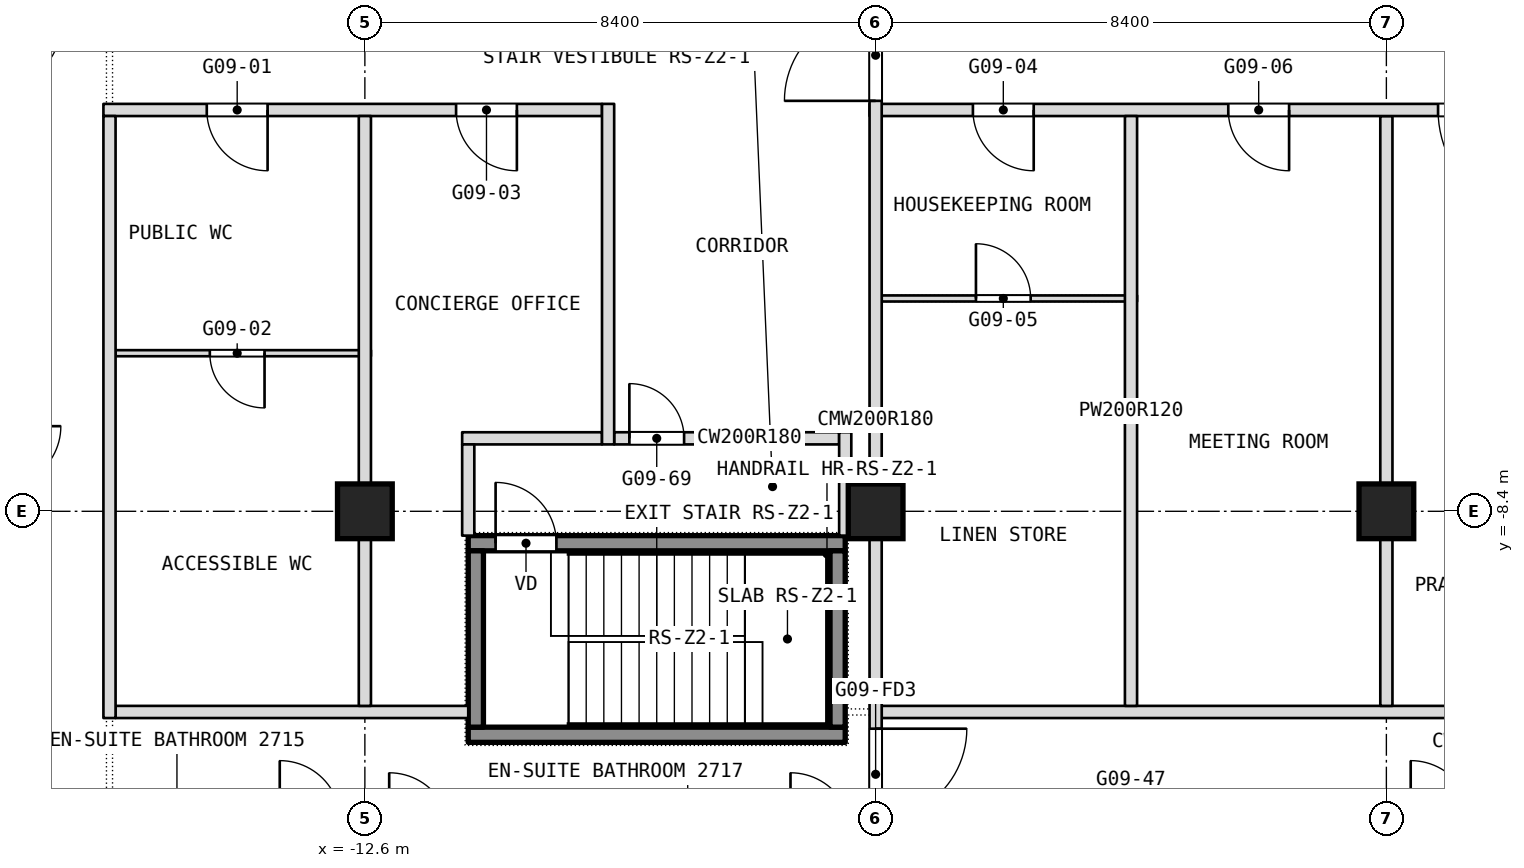
"""IFC4 building model, lengths in metres.
Left out: names, types, materials, properties, quantities, classifications, styles, units other than length and angle.
Written with IfcOpenShell. Run it as: python <this file> out.ifc"""

import sys

from ifc_helpers import new_model, si_unit, direction, frame, frame_2d, origin, origin_2d, place, context, subcontext, project, spatial, rectangle, extrude, element, fill, save


model = new_model("IFC4")
c1 = context("Model", 3, precision=1e-05, world=origin(), true_north=direction((0.0, 1.0)))
c2 = subcontext(c1, "Body", "Model", "MODEL_VIEW")
j1 = project(units=[si_unit("LENGTHUNIT", "METRE"), si_unit("PLANEANGLEUNIT", "RADIAN")], contexts=[c1])
p1 = place(None, origin())
s1 = spatial("IfcSite", under=j1, at=p1, CompositionType="ELEMENT")
p2 = place(p1, origin())
s2 = spatial("IfcBuilding", under=s1, at=p2, CompositionType="ELEMENT")
p3 = place(p2, frame((0.0, 0.0, 122.9)))
s3 = spatial("IfcBuildingStorey", under=s2, at=p3, CompositionType="ELEMENT", Elevation=122.9)
for number, where, z_axis, x_axis in (
    (1, (-12.6, -8.4, 0.0), (0.0, 0.0, 1.0), (1.0, 0.0, 0.0)),
    (2, (-4.2, -8.4, 0.0), (0.0, 0.0, 1.0), (1.0, 0.0, 0.0)),
    (3, (4.2, -8.4, 0.0), (0.0, 0.0, 1.0), (1.0, 0.0, 0.0)),
):
    element("IfcColumn", number, at=place(p3, frame(where, z_axis=z_axis, x_axis=x_axis)), inside=s3, PredefinedType="COLUMN", context=c2, shape_type="SweptSolid", body=[
        extrude(rectangle(XDim=0.9, YDim=0.9, at=origin_2d()), origin(), (0.0, 0.0, 1.0), 3.6),
    ])
p4 = place(p3, frame((-16.7, -11.7, 0.0), z_axis=(0.0, 0.0, 1.0), x_axis=(1.0, 0.0, 0.0)))
e4 = element("IfcWall", 4, at=p4, inside=s3, PredefinedType="PARTITIONING", context=c2, shape_type="SweptSolid", body=[
    extrude(rectangle(XDim=5.8, YDim=0.2, at=frame_2d((2.9, 0.0))), origin(), (0.0, 0.0, 1.0), 3.34),
])
p5 = place(p3, frame((-4.1, -11.7, 0.0), z_axis=(0.0, 0.0, 1.0), x_axis=(1.0, 0.0, 0.0)))
e5 = element("IfcWall", 5, at=p5, inside=s3, PredefinedType="PARTITIONING", context=c2, shape_type="SweptSolid", body=[
    extrude(rectangle(XDim=20.8, YDim=0.2, at=frame_2d((10.4, 0.0))), origin(), (0.0, 0.0, 1.0), 3.34),
])
p6 = place(p3, frame((-11.0, -7.2, 0.0), z_axis=(0.0, 0.0, 1.0), x_axis=(1.0, 0.0, 0.0)))
e6 = element("IfcWall", 6, at=p6, inside=s3, PredefinedType="PARTITIONING", context=c2, shape_type="SweptSolid", body=[
    extrude(rectangle(XDim=2.3, YDim=0.2, at=frame_2d((1.15, 0.0))), origin(), (0.0, 0.0, 1.0), 3.34),
])
p7 = place(p3, frame((-8.5, -7.2, 0.0), z_axis=(0.0, 0.0, 1.0), x_axis=(1.0, 0.0, 0.0)))
e7 = element("IfcWall", 7, at=p7, inside=s3, PredefinedType="PARTITIONING", context=c2, shape_type="SweptSolid", body=[
    extrude(rectangle(XDim=3.7, YDim=0.2, at=frame_2d((1.85, 0.0))), origin(), (0.0, 0.0, 1.0), 3.34),
])
p8 = place(p7, frame((0.25, 0.0, 0.0)))
e8 = element("IfcOpeningElement", 8, at=p8, cuts=e7, PredefinedType="OPENING", context=c2, shape_type="SweptSolid", body=[
    extrude(rectangle(XDim=0.9, YDim=2.1, at=frame_2d((0.45, 1.05))), frame((0.0, 0.1, 0.0), z_axis=(0.0, -1.0, 0.0), x_axis=(1.0, 0.0, 0.0)), (0.0, 0.0, 1.0), 0.2),
])
p9 = place(p3, frame((-16.7, -5.8, 0.0), z_axis=(0.0, 0.0, 1.0), x_axis=(1.0, 0.0, 0.0)))
e9 = element("IfcWall", 9, at=p9, inside=s3, PredefinedType="PARTITIONING", context=c2, shape_type="SweptSolid", body=[
    extrude(rectangle(XDim=4.2, YDim=0.1, at=frame_2d((2.1, 0.0))), origin(), (0.0, 0.0, 1.0), 3.34),
])
p10 = place(p9, frame((1.55, 0.0, 0.0)))
e10 = element("IfcOpeningElement", 10, at=p10, cuts=e9, PredefinedType="OPENING", context=c2, shape_type="SweptSolid", body=[
    extrude(rectangle(XDim=0.9, YDim=2.1, at=frame_2d((0.45, 1.05))), frame((0.0, 0.05, 0.0), z_axis=(0.0, -1.0, 0.0), x_axis=(1.0, 0.0, 0.0)), (0.0, 0.0, 1.0), 0.1),
])
p11 = place(p3, frame((-4.1, -4.9, 0.0), z_axis=(0.0, 0.0, 1.0), x_axis=(1.0, 0.0, 0.0)))
e11 = element("IfcWall", 11, at=p11, inside=s3, PredefinedType="PARTITIONING", context=c2, shape_type="SweptSolid", body=[
    extrude(rectangle(XDim=4.2, YDim=0.1, at=frame_2d((2.1, 0.0))), origin(), (0.0, 0.0, 1.0), 3.34),
])
p12 = place(p11, frame((1.55, 0.0, 0.0)))
e12 = element("IfcOpeningElement", 12, at=p12, cuts=e11, PredefinedType="OPENING", context=c2, shape_type="SweptSolid", body=[
    extrude(rectangle(XDim=0.9, YDim=2.1, at=frame_2d((0.45, 1.05))), frame((0.0, 0.05, 0.0), z_axis=(0.0, -1.0, 0.0), x_axis=(1.0, 0.0, 0.0)), (0.0, 0.0, 1.0), 0.1),
])
p13 = place(p3, frame((4.2, -11.6, 0.0), z_axis=(0.0, 0.0, 1.0), x_axis=(0.0, 1.0, 0.0)))
e13 = element("IfcWall", 13, at=p13, inside=s3, PredefinedType="PARTITIONING", context=c2, shape_type="SweptSolid", body=[
    extrude(rectangle(XDim=9.7, YDim=0.2, at=frame_2d((4.85, 0.0))), origin(), (0.0, 0.0, 1.0), 3.34),
])
p14 = place(p3, frame((-16.9, -1.8, 0.0), z_axis=(0.0, 0.0, 1.0), x_axis=(1.0, 0.0, 0.0)))
e14 = element("IfcWall", 14, at=p14, inside=s3, PredefinedType="PARTITIONING", context=c2, shape_type="SweptSolid", body=[
    extrude(rectangle(XDim=8.2, YDim=0.2, at=frame_2d((4.1, 0.0))), origin(), (0.0, 0.0, 1.0), 3.34),
])
p15 = place(p14, frame((1.7, 0.0, 0.0)))
e15 = element("IfcOpeningElement", 15, at=p15, cuts=e14, PredefinedType="OPENING", context=c2, shape_type="SweptSolid", body=[
    extrude(rectangle(XDim=1.0, YDim=2.1, at=frame_2d((0.5, 1.05))), frame((0.0, 0.1, 0.0), z_axis=(0.0, -1.0, 0.0), x_axis=(1.0, 0.0, 0.0)), (0.0, 0.0, 1.0), 0.2),
])
p16 = place(p14, frame((5.8, 0.0, 0.0)))
e16 = element("IfcOpeningElement", 16, at=p16, cuts=e14, PredefinedType="OPENING", context=c2, shape_type="SweptSolid", body=[
    extrude(rectangle(XDim=1.0, YDim=2.1, at=frame_2d((0.5, 1.05))), frame((0.0, 0.1, 0.0), z_axis=(0.0, -1.0, 0.0), x_axis=(1.0, 0.0, 0.0)), (0.0, 0.0, 1.0), 0.2),
])
p17 = place(p3, frame((-4.3, -1.8, 0.0), z_axis=(0.0, 0.0, 1.0), x_axis=(1.0, 0.0, 0.0)))
e17 = element("IfcWall", 17, at=p17, inside=s3, PredefinedType="PARTITIONING", context=c2, shape_type="SweptSolid", body=[
    extrude(rectangle(XDim=11.3, YDim=0.2, at=frame_2d((5.65, 0.0))), origin(), (0.0, 0.0, 1.0), 3.34),
])
p18 = place(p17, frame((1.7, 0.0, 0.0)))
e18 = element("IfcOpeningElement", 18, at=p18, cuts=e17, PredefinedType="OPENING", context=c2, shape_type="SweptSolid", body=[
    extrude(rectangle(XDim=1.0, YDim=2.1, at=frame_2d((0.5, 1.05))), frame((0.0, 0.1, 0.0), z_axis=(0.0, -1.0, 0.0), x_axis=(1.0, 0.0, 0.0)), (0.0, 0.0, 1.0), 0.2),
])
p19 = place(p17, frame((5.9, 0.0, 0.0)))
e19 = element("IfcOpeningElement", 19, at=p19, cuts=e17, PredefinedType="OPENING", context=c2, shape_type="SweptSolid", body=[
    extrude(rectangle(XDim=1.0, YDim=2.1, at=frame_2d((0.5, 1.05))), frame((0.0, 0.1, 0.0), z_axis=(0.0, -1.0, 0.0), x_axis=(1.0, 0.0, 0.0)), (0.0, 0.0, 1.0), 0.2),
])
p20 = place(p17, frame((9.35, 0.0, 0.0)))
e20 = element("IfcOpeningElement", 20, at=p20, cuts=e17, PredefinedType="OPENING", context=c2, shape_type="SweptSolid", body=[
    extrude(rectangle(XDim=1.8, YDim=2.1, at=frame_2d((0.9, 1.05))), frame((0.0, 0.1, 0.0), z_axis=(0.0, -1.0, 0.0), x_axis=(1.0, 0.0, 0.0)), (0.0, 0.0, 1.0), 0.2),
])
p21 = place(p3, frame((0.0, -11.6, 0.0), z_axis=(0.0, 0.0, 1.0), x_axis=(0.0, 1.0, 0.0)))
e21 = element("IfcWall", 21, at=p21, inside=s3, PredefinedType="PARTITIONING", context=c2, shape_type="SweptSolid", body=[
    extrude(rectangle(XDim=9.7, YDim=0.2, at=frame_2d((4.85, 0.0))), origin(), (0.0, 0.0, 1.0), 3.34),
])
p22 = place(p3, frame((-4.2, -13.8, 0.0), z_axis=(0.0, 0.0, 1.0), x_axis=(0.0, 1.0, 0.0)))
e22 = element("IfcWall", 22, at=p22, inside=s3, PredefinedType="PARTITIONING", context=c2, shape_type="SweptSolid", body=[
    extrude(rectangle(XDim=13.8, YDim=0.2, at=frame_2d((6.9, 0.0))), origin(), (0.0, 0.0, 1.0), 3.34),
])
p23 = place(p22, frame((12.15, 0.0, 0.0)))
e23 = element("IfcOpeningElement", 23, at=p23, cuts=e22, PredefinedType="OPENING", context=c2, shape_type="SweptSolid", body=[
    extrude(rectangle(XDim=1.5, YDim=2.1, at=frame_2d((0.75, 1.05))), frame((0.0, 0.1, 0.0), z_axis=(0.0, -1.0, 0.0), x_axis=(1.0, 0.0, 0.0)), (0.0, 0.0, 1.0), 0.2),
])
p24 = place(p22, frame((0.325, 0.0, 0.0)))
e24 = element("IfcOpeningElement", 24, at=p24, cuts=e22, PredefinedType="OPENING", context=c2, shape_type="SweptSolid", body=[
    extrude(rectangle(XDim=1.5, YDim=2.1, at=frame_2d((0.75, 1.05))), frame((0.0, 0.1, 0.0), z_axis=(0.0, -1.0, 0.0), x_axis=(1.0, 0.0, 0.0)), (0.0, 0.0, 1.0), 0.2),
])
p25 = place(p3, frame((-4.7, -8.8, 0.0), z_axis=(0.0, 0.0, 1.0), x_axis=(0.0, 1.0, 0.0)))
e25 = element("IfcWall", 25, at=p25, inside=s3, PredefinedType="PARTITIONING", context=c2, shape_type="SweptSolid", body=[
    extrude(rectangle(XDim=1.7, YDim=0.2, at=frame_2d((0.85, 0.0))), origin(), (0.0, 0.0, 1.0), 3.34),
])
p26 = place(p3, frame((-8.6, -7.3, 0.0), z_axis=(0.0, 0.0, 1.0), x_axis=(0.0, 1.0, 0.0)))
e26 = element("IfcWall", 26, at=p26, inside=s3, PredefinedType="PARTITIONING", context=c2, shape_type="SweptSolid", body=[
    extrude(rectangle(XDim=5.6, YDim=0.2, at=frame_2d((2.8, 0.0))), origin(), (0.0, 0.0, 1.0), 3.34),
])
p27 = place(p3, frame((-10.9, -8.8, 0.0), z_axis=(0.0, 0.0, 1.0), x_axis=(0.0, 1.0, 0.0)))
e27 = element("IfcWall", 27, at=p27, inside=s3, PredefinedType="PARTITIONING", context=c2, shape_type="SweptSolid", body=[
    extrude(rectangle(XDim=1.5, YDim=0.2, at=frame_2d((0.75, 0.0))), origin(), (0.0, 0.0, 1.0), 3.34),
])
p28 = place(p3, frame((-12.6, -11.6, 0.0), z_axis=(0.0, 0.0, 1.0), x_axis=(0.0, 1.0, 0.0)))
e28 = element("IfcWall", 28, at=p28, inside=s3, PredefinedType="PARTITIONING", context=c2, shape_type="SweptSolid", body=[
    extrude(rectangle(XDim=9.7, YDim=0.2, at=frame_2d((4.85, 0.0))), origin(), (0.0, 0.0, 1.0), 3.34),
])
p29 = place(p3, frame((-16.8, -11.8, 0.0), z_axis=(0.0, 0.0, 1.0), x_axis=(0.0, 1.0, 0.0)))
e29 = element("IfcWall", 29, at=p29, inside=s3, PredefinedType="PARTITIONING", context=c2, shape_type="SweptSolid", body=[
    extrude(rectangle(XDim=9.9, YDim=0.2, at=frame_2d((4.95, 0.0))), origin(), (0.0, 0.0, 1.0), 3.34),
])
p30 = place(p3, frame((-10.9, -12.075, 0.1), z_axis=(0.0, 0.0, 1.0), x_axis=(1.0, 0.0, 0.0)))
e30 = element("IfcWall", 30, at=p30, inside=s3, PredefinedType="SHEAR", context=c2, shape_type="SweptSolid", body=[
    extrude(rectangle(XDim=6.2, YDim=0.25, at=frame_2d((3.1, 0.0))), origin(), (0.0, 0.0, 1.0), 3.6),
])
p31 = place(p3, frame((-10.9, -8.925, 0.1), z_axis=(0.0, 0.0, 1.0), x_axis=(1.0, 0.0, 0.0)))
e31 = element("IfcWall", 31, at=p31, inside=s3, PredefinedType="SHEAR", context=c2, shape_type="SweptSolid", body=[
    extrude(rectangle(XDim=6.2, YDim=0.25, at=frame_2d((3.1, 0.0))), origin(), (0.0, 0.0, 1.0), 3.6),
])
p32 = place(p31, frame((0.45, 0.0, 0.0)))
e32 = element("IfcOpeningElement", 32, at=p32, cuts=e31, PredefinedType="OPENING", context=c2, shape_type="SweptSolid", body=[
    extrude(rectangle(XDim=1.0, YDim=2.1, at=frame_2d((0.5, 1.05))), frame((0.0, 0.125, 0.0), z_axis=(0.0, -1.0, 0.0), x_axis=(1.0, 0.0, 0.0)), (0.0, 0.0, 1.0), 0.25),
])
for number, where, z_axis, x_axis in (
    (33, (-10.775, -11.95, 0.1), (0.0, 0.0, 1.0), (0.0, 1.0, 0.0)),
    (34, (-4.825, -11.95, 0.1), (0.0, 0.0, 1.0), (0.0, 1.0, 0.0)),
):
    element("IfcWall", number, at=place(p3, frame(where, z_axis=z_axis, x_axis=x_axis)), inside=s3, PredefinedType="SHEAR", context=c2, shape_type="SweptSolid", body=[
        extrude(rectangle(XDim=2.9, YDim=0.25, at=frame_2d((1.45, 0.0))), origin(), (0.0, 0.0, 1.0), 3.6),
    ])
p33 = place(p8, origin())
e35 = element("IfcDoor", 35, at=p33, inside=s3, OperationType="SINGLE_SWING_RIGHT", PredefinedType="DOOR", context=c2, shape_type="SweptSolid", body=[
    extrude(rectangle(XDim=0.9, YDim=2.1, at=frame_2d((0.45, 1.05))), frame((0.0, 0.025, 0.0), z_axis=(0.0, -1.0, 0.0), x_axis=(1.0, 0.0, 0.0)), (0.0, 0.0, 1.0), 0.05),
])
fill(e8, e35)
p34 = place(p10, origin())
e36 = element("IfcDoor", 36, at=p34, inside=s3, OperationType="SINGLE_SWING_RIGHT", PredefinedType="DOOR", context=c2, shape_type="SweptSolid", body=[
    extrude(rectangle(XDim=0.9, YDim=2.1, at=frame_2d((0.45, 1.05))), frame((0.0, 0.025, 0.0), z_axis=(0.0, -1.0, 0.0), x_axis=(1.0, 0.0, 0.0)), (0.0, 0.0, 1.0), 0.05),
])
fill(e10, e36)
p35 = place(p12, origin())
e37 = element("IfcDoor", 37, at=p35, inside=s3, OperationType="SINGLE_SWING_LEFT", PredefinedType="DOOR", context=c2, shape_type="SweptSolid", body=[
    extrude(rectangle(XDim=0.9, YDim=2.1, at=frame_2d((0.45, 1.05))), frame((0.0, 0.025, 0.0), z_axis=(0.0, -1.0, 0.0), x_axis=(1.0, 0.0, 0.0)), (0.0, 0.0, 1.0), 0.05),
])
fill(e12, e37)
p36 = place(p15, origin())
e38 = element("IfcDoor", 38, at=p36, inside=s3, OperationType="SINGLE_SWING_LEFT", PredefinedType="DOOR", context=c2, shape_type="SweptSolid", body=[
    extrude(rectangle(XDim=1.0, YDim=2.1, at=frame_2d((0.5, 1.05))), frame((0.0, 0.025, 0.0), z_axis=(0.0, -1.0, 0.0), x_axis=(1.0, 0.0, 0.0)), (0.0, 0.0, 1.0), 0.05),
])
fill(e15, e38)
p37 = place(p16, origin())
e39 = element("IfcDoor", 39, at=p37, inside=s3, OperationType="SINGLE_SWING_LEFT", PredefinedType="DOOR", context=c2, shape_type="SweptSolid", body=[
    extrude(rectangle(XDim=1.0, YDim=2.1, at=frame_2d((0.5, 1.05))), frame((0.0, 0.025, 0.0), z_axis=(0.0, -1.0, 0.0), x_axis=(1.0, 0.0, 0.0)), (0.0, 0.0, 1.0), 0.05),
])
fill(e16, e39)
p38 = place(p18, origin())
e40 = element("IfcDoor", 40, at=p38, inside=s3, OperationType="SINGLE_SWING_RIGHT", PredefinedType="DOOR", context=c2, shape_type="SweptSolid", body=[
    extrude(rectangle(XDim=1.0, YDim=2.1, at=frame_2d((0.5, 1.05))), frame((0.0, 0.025, 0.0), z_axis=(0.0, -1.0, 0.0), x_axis=(1.0, 0.0, 0.0)), (0.0, 0.0, 1.0), 0.05),
])
fill(e18, e40)
p39 = place(p19, origin())
e41 = element("IfcDoor", 41, at=p39, inside=s3, OperationType="SINGLE_SWING_RIGHT", PredefinedType="DOOR", context=c2, shape_type="SweptSolid", body=[
    extrude(rectangle(XDim=1.0, YDim=2.1, at=frame_2d((0.5, 1.05))), frame((0.0, 0.025, 0.0), z_axis=(0.0, -1.0, 0.0), x_axis=(1.0, 0.0, 0.0)), (0.0, 0.0, 1.0), 0.05),
])
fill(e19, e41)
p40 = place(p20, origin())
e42 = element("IfcDoor", 42, at=p40, inside=s3, OperationType="DOUBLE_DOOR_SINGLE_SWING", PredefinedType="DOOR", context=c2, shape_type="SweptSolid", body=[
    extrude(rectangle(XDim=1.8, YDim=2.1, at=frame_2d((0.9, 1.05))), frame((0.0, 0.025, 0.0), z_axis=(0.0, -1.0, 0.0), x_axis=(1.0, 0.0, 0.0)), (0.0, 0.0, 1.0), 0.05),
])
fill(e20, e42)
p41 = place(p32, origin())
e43 = element("IfcDoor", 43, at=p41, inside=s3, OperationType="SINGLE_SWING_LEFT", PredefinedType="DOOR", context=c2, shape_type="SweptSolid", body=[
    extrude(rectangle(XDim=1.0, YDim=2.1, at=frame_2d((0.5, 1.05))), frame((0.0, 0.025, 0.0), z_axis=(0.0, -1.0, 0.0), x_axis=(1.0, 0.0, 0.0)), (0.0, 0.0, 1.0), 0.05),
])
fill(e32, e43)
p42 = place(p23, origin())
e44 = element("IfcDoor", 44, at=p42, inside=s3, OperationType="DOUBLE_DOOR_DOUBLE_SWING", PredefinedType="DOOR", context=c2, shape_type="SweptSolid", body=[
    extrude(rectangle(XDim=1.5, YDim=2.1, at=frame_2d((0.75, 1.05))), frame((0.0, 0.025, 0.0), z_axis=(0.0, -1.0, 0.0), x_axis=(1.0, 0.0, 0.0)), (0.0, 0.0, 1.0), 0.05),
])
fill(e23, e44)
p43 = place(p24, origin())
e45 = element("IfcDoor", 45, at=p43, inside=s3, OperationType="DOUBLE_DOOR_DOUBLE_SWING", PredefinedType="DOOR", context=c2, shape_type="SweptSolid", body=[
    extrude(rectangle(XDim=1.5, YDim=2.1, at=frame_2d((0.75, 1.05))), frame((0.0, 0.025, 0.0), z_axis=(0.0, -1.0, 0.0), x_axis=(1.0, 0.0, 0.0)), (0.0, 0.0, 1.0), 0.05),
])
fill(e24, e45)
save(model, sys.argv[1])
